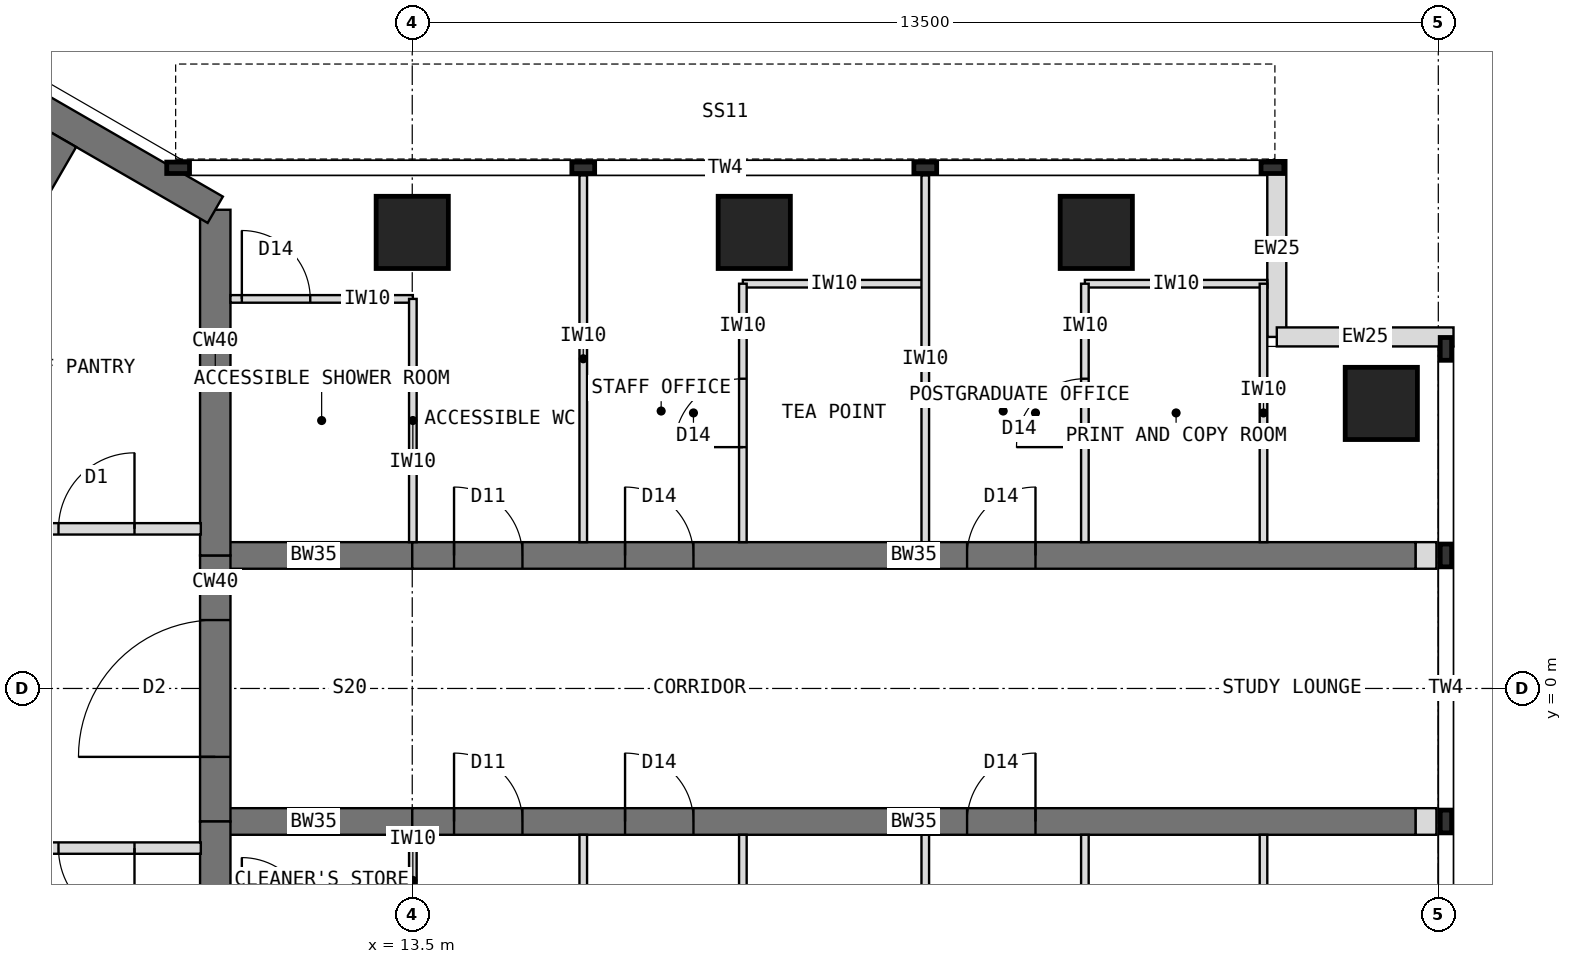
"""IFC4 building model, lengths in metres.
Left out: names, types, materials, properties, quantities, classifications, styles, units other than length and angle.
Written with IfcOpenShell. Run it as: python <this file> out.ifc"""

import sys

from ifc_helpers import new_model, si_unit, direction, frame, frame_2d, origin, origin_2d, place, context, subcontext, project, spatial, rectangle, extrude, element, fill, save


model = new_model("IFC4")
c1 = context("Model", 3, precision=1e-05, world=origin(), true_north=direction((0.0, 1.0)))
c2 = subcontext(c1, "Body", "Model", "MODEL_VIEW")
j1 = project(units=[si_unit("LENGTHUNIT", "METRE"), si_unit("PLANEANGLEUNIT", "RADIAN")], contexts=[c1])
p1 = place(None, origin())
s1 = spatial("IfcSite", under=j1, at=p1, CompositionType="ELEMENT")
p2 = place(p1, origin())
s2 = spatial("IfcBuilding", under=s1, at=p2, CompositionType="ELEMENT")
p3 = place(p2, frame((0.0, 0.0, 279.5)))
s3 = spatial("IfcBuildingStorey", under=s2, at=p3, CompositionType="ELEMENT", Elevation=279.5)
p4 = place(p3, frame((10.908, -6.298, 0.0), z_axis=(0.0, 0.0, 1.0), x_axis=(0.0, 1.0, 0.0)))
e1 = element("IfcWall", 1, at=p4, inside=s3, PredefinedType="SHEAR", context=c2, shape_type="SweptSolid", body=[
    extrude(rectangle(XDim=4.548, YDim=0.4, at=frame_2d((2.274, 0.0))), origin(), (0.0, 0.0, 1.0), 4.0),
])
p5 = place(p3, frame((10.908, -1.75, 0.0), z_axis=(0.0, 0.0, 1.0), x_axis=(0.0, 1.0, 0.0)))
e2 = element("IfcWall", 2, at=p5, inside=s3, PredefinedType="SHEAR", context=c2, shape_type="SweptSolid", body=[
    extrude(rectangle(XDim=3.5, YDim=0.4, at=frame_2d((1.75, 0.0))), origin(), (0.0, 0.0, 1.0), 4.0),
])
p6 = place(p5, frame((0.85, 0.0, 0.0)))
e3 = element("IfcOpeningElement", 3, at=p6, cuts=e2, PredefinedType="OPENING", context=c2, shape_type="SweptSolid", body=[
    extrude(rectangle(XDim=1.8, YDim=2.1, at=frame_2d((0.9, 1.05))), frame((0.0, 0.21, 0.0), z_axis=(0.0, -1.0, 0.0), x_axis=(1.0, 0.0, 0.0)), (0.0, 0.0, 1.0), 0.42),
])
p7 = place(p3, frame((10.908, 1.75, 0.0), z_axis=(0.0, 0.0, 1.0), x_axis=(0.0, 1.0, 0.0)))
e4 = element("IfcWall", 4, at=p7, inside=s3, PredefinedType="SHEAR", context=c2, shape_type="SweptSolid", body=[
    extrude(rectangle(XDim=4.548, YDim=0.4, at=frame_2d((2.274, 0.0))), origin(), (0.0, 0.0, 1.0), 4.0),
])
p8 = place(p3, frame((10.908, 6.298, 0.0), z_axis=(0.0, 0.0, 1.0), x_axis=(-0.866021940709, 0.500005998175, 0.0)))
e5 = element("IfcWall", 5, at=p8, inside=s3, PredefinedType="SHEAR", context=c2, shape_type="SweptSolid", body=[
    extrude(rectangle(XDim=12.596, YDim=0.4, at=frame_2d((6.298, 0.0))), origin(), (0.0, 0.0, 1.0), 4.0),
])
p9 = place(p3, frame((10.908, 1.75, 0.0), z_axis=(0.0, 0.0, 1.0), x_axis=(1.0, 0.0, 0.0)))
e6 = element("IfcWall", 6, at=p9, inside=s3, PredefinedType="SHEAR", context=c2, shape_type="SweptSolid", body=[
    extrude(rectangle(XDim=2.592, YDim=0.35, at=frame_2d((1.296, 0.0))), origin(), (0.0, 0.0, 1.0), 4.0),
])
p10 = place(p3, frame((13.5, 1.75, 0.0), z_axis=(0.0, 0.0, 1.0), x_axis=(1.0, 0.0, 0.0)))
e7 = element("IfcWall", 7, at=p10, inside=s3, PredefinedType="SHEAR", context=c2, shape_type="SweptSolid", body=[
    extrude(rectangle(XDim=13.2, YDim=0.35, at=frame_2d((6.6, 0.0))), origin(), (0.0, 0.0, 1.0), 4.0),
])
p11 = place(p10, frame((0.55, 0.0, 0.0)))
e8 = element("IfcOpeningElement", 8, at=p11, cuts=e7, PredefinedType="OPENING", context=c2, shape_type="SweptSolid", body=[
    extrude(rectangle(XDim=0.9, YDim=2.1, at=frame_2d((0.45, 1.05))), frame((0.0, 0.185, 0.0), z_axis=(0.0, -1.0, 0.0), x_axis=(1.0, 0.0, 0.0)), (0.0, 0.0, 1.0), 0.37),
])
p12 = place(p10, frame((2.8, 0.0, 0.0)))
e9 = element("IfcOpeningElement", 9, at=p12, cuts=e7, PredefinedType="OPENING", context=c2, shape_type="SweptSolid", body=[
    extrude(rectangle(XDim=0.9, YDim=2.1, at=frame_2d((0.45, 1.05))), frame((0.0, 0.185, 0.0), z_axis=(0.0, -1.0, 0.0), x_axis=(1.0, 0.0, 0.0)), (0.0, 0.0, 1.0), 0.37),
])
p13 = place(p10, frame((7.3, 0.0, 0.0)))
e10 = element("IfcOpeningElement", 10, at=p13, cuts=e7, PredefinedType="OPENING", context=c2, shape_type="SweptSolid", body=[
    extrude(rectangle(XDim=0.9, YDim=2.1, at=frame_2d((0.45, 1.05))), frame((0.0, 0.185, 0.0), z_axis=(0.0, -1.0, 0.0), x_axis=(1.0, 0.0, 0.0)), (0.0, 0.0, 1.0), 0.37),
])
p14 = place(p3, frame((10.908, -1.75, 0.0), z_axis=(0.0, 0.0, 1.0), x_axis=(1.0, 0.0, 0.0)))
e11 = element("IfcWall", 11, at=p14, inside=s3, PredefinedType="SHEAR", context=c2, shape_type="SweptSolid", body=[
    extrude(rectangle(XDim=2.592, YDim=0.35, at=frame_2d((1.296, 0.0))), origin(), (0.0, 0.0, 1.0), 4.0),
])
p15 = place(p3, frame((13.5, -1.75, 0.0), z_axis=(0.0, 0.0, 1.0), x_axis=(1.0, 0.0, 0.0)))
e12 = element("IfcWall", 12, at=p15, inside=s3, PredefinedType="SHEAR", context=c2, shape_type="SweptSolid", body=[
    extrude(rectangle(XDim=13.2, YDim=0.35, at=frame_2d((6.6, 0.0))), origin(), (0.0, 0.0, 1.0), 4.0),
])
p16 = place(p15, frame((0.55, 0.0, 0.0)))
e13 = element("IfcOpeningElement", 13, at=p16, cuts=e12, PredefinedType="OPENING", context=c2, shape_type="SweptSolid", body=[
    extrude(rectangle(XDim=0.9, YDim=2.1, at=frame_2d((0.45, 1.05))), frame((0.0, 0.185, 0.0), z_axis=(0.0, -1.0, 0.0), x_axis=(1.0, 0.0, 0.0)), (0.0, 0.0, 1.0), 0.37),
])
p17 = place(p15, frame((2.8, 0.0, 0.0)))
e14 = element("IfcOpeningElement", 14, at=p17, cuts=e12, PredefinedType="OPENING", context=c2, shape_type="SweptSolid", body=[
    extrude(rectangle(XDim=0.9, YDim=2.1, at=frame_2d((0.45, 1.05))), frame((0.0, 0.185, 0.0), z_axis=(0.0, -1.0, 0.0), x_axis=(1.0, 0.0, 0.0)), (0.0, 0.0, 1.0), 0.37),
])
p18 = place(p15, frame((7.3, 0.0, 0.0)))
e15 = element("IfcOpeningElement", 15, at=p18, cuts=e12, PredefinedType="OPENING", context=c2, shape_type="SweptSolid", body=[
    extrude(rectangle(XDim=0.9, YDim=2.1, at=frame_2d((0.45, 1.05))), frame((0.0, 0.185, 0.0), z_axis=(0.0, -1.0, 0.0), x_axis=(1.0, 0.0, 0.0)), (0.0, 0.0, 1.0), 0.37),
])
for number, where, z_axis, x_axis in (
    (16, (13.5, 6.0, 0.0), (0.0, 0.0, 1.0), (1.0, 0.0, 0.0)),
    (17, (18.0, 6.0, 0.0), (0.0, 0.0, 1.0), (1.0, 0.0, 0.0)),
    (18, (22.5, 6.0, 0.0), (0.0, 0.0, 1.0), (1.0, 0.0, 0.0)),
    (19, (26.25, 3.75, 0.0), (0.0, 0.0, 1.0), (1.0, 0.0, 0.0)),
):
    element("IfcColumn", number, at=place(p3, frame(where, z_axis=z_axis, x_axis=x_axis)), inside=s3, PredefinedType="COLUMN", context=c2, shape_type="SweptSolid", body=[
        extrude(rectangle(XDim=0.95, YDim=0.95, at=origin_2d()), origin(), (0.0, 0.0, 1.0), 4.0),
    ])
for number, where, z_axis, x_axis in (
    (20, (24.875, 6.95, 0.0), (0.0, 0.0, 1.0), (0.0, -1.0, 0.0)),
    (21, (24.875, 4.625, 0.0), (0.0, 0.0, 1.0), (1.0, 0.0, 0.0)),
):
    element("IfcWall", number, at=place(p3, frame(where, z_axis=z_axis, x_axis=x_axis)), inside=s3, PredefinedType="STANDARD", context=c2, shape_type="SweptSolid", body=[
        extrude(rectangle(XDim=2.325, YDim=0.25, at=frame_2d((1.163, 0.0))), origin(), (0.0, 0.0, 1.0), 3.8),
    ])
for number, where, z_axis, x_axis in (
    (22, (26.7, 1.75, 0.0), (0.0, 0.0, 1.0), (1.0, 0.0, 0.0)),
    (23, (26.7, -1.75, 0.0), (0.0, 0.0, 1.0), (1.0, 0.0, 0.0)),
):
    element("IfcWall", number, at=place(p3, frame(where, z_axis=z_axis, x_axis=x_axis)), inside=s3, PredefinedType="PARTITIONING", context=c2, shape_type="SweptSolid", body=[
        extrude(rectangle(XDim=0.275, YDim=0.35, at=frame_2d((0.138, 0.0))), origin(), (0.0, 0.0, 1.0), 3.8),
    ])
for number, where, z_axis, x_axis in (
    (24, (5.901, 2.02, 0.0), (0.0, 0.0, 1.0), (0.5, 0.866, 0.0)),
    (25, (5.901, -2.02, 0.0), (0.0, 0.0, 1.0), (0.5, -0.866, 0.0)),
):
    element("IfcWall", number, at=place(p3, frame(where, z_axis=z_axis, x_axis=x_axis)), inside=s3, PredefinedType="SHEAR", context=c2, shape_type="SweptSolid", body=[
        extrude(rectangle(XDim=6.008, YDim=0.4, at=frame_2d((3.004, 0.0))), origin(), (0.0, 0.0, 1.0), 4.0),
    ])
for number, where, z_axis, x_axis in (
    (26, (15.75, 1.925, 0.0), (0.0, 0.0, 1.0), (0.0, 1.0, 0.0)),
    (27, (20.25, 1.925, 0.0), (0.0, 0.0, 1.0), (0.0, 1.0, 0.0)),
):
    element("IfcWall", number, at=place(p3, frame(where, z_axis=z_axis, x_axis=x_axis)), inside=s3, PredefinedType="PARTITIONING", context=c2, shape_type="SweptSolid", body=[
        extrude(rectangle(XDim=4.825, YDim=0.1, at=frame_2d((2.413, 0.0))), origin(), (0.0, 0.0, 1.0), 3.8),
    ])
p19 = place(p3, frame((17.85, 5.325, 0.0), z_axis=(0.0, 0.0, 1.0), x_axis=(1.0, 0.0, 0.0)))
e28 = element("IfcWall", 28, at=p19, inside=s3, PredefinedType="PARTITIONING", context=c2, shape_type="SweptSolid", body=[
    extrude(rectangle(XDim=2.4, YDim=0.1, at=frame_2d((1.2, 0.0))), origin(), (0.0, 0.0, 1.0), 3.8),
])
p20 = place(p3, frame((17.85, 1.925, 0.0), z_axis=(0.0, 0.0, 1.0), x_axis=(0.0, 1.0, 0.0)))
e29 = element("IfcWall", 29, at=p20, inside=s3, PredefinedType="PARTITIONING", context=c2, shape_type="SweptSolid", body=[
    extrude(rectangle(XDim=3.4, YDim=0.1, at=frame_2d((1.7, 0.0))), origin(), (0.0, 0.0, 1.0), 3.8),
])
p21 = place(p20, frame((1.25, 0.0, 0.0)))
e30 = element("IfcOpeningElement", 30, at=p21, cuts=e29, PredefinedType="OPENING", context=c2, shape_type="SweptSolid", body=[
    extrude(rectangle(XDim=0.9, YDim=2.1, at=frame_2d((0.45, 1.05))), frame((0.0, 0.06, 0.0), z_axis=(0.0, -1.0, 0.0), x_axis=(1.0, 0.0, 0.0)), (0.0, 0.0, 1.0), 0.12),
])
p22 = place(p3, frame((22.35, 5.325, 0.0), z_axis=(0.0, 0.0, 1.0), x_axis=(1.0, 0.0, 0.0)))
e31 = element("IfcWall", 31, at=p22, inside=s3, PredefinedType="PARTITIONING", context=c2, shape_type="SweptSolid", body=[
    extrude(rectangle(XDim=2.4, YDim=0.1, at=frame_2d((1.2, 0.0))), origin(), (0.0, 0.0, 1.0), 3.8),
])
p23 = place(p3, frame((22.35, 1.925, 0.0), z_axis=(0.0, 0.0, 1.0), x_axis=(0.0, 1.0, 0.0)))
e32 = element("IfcWall", 32, at=p23, inside=s3, PredefinedType="PARTITIONING", context=c2, shape_type="SweptSolid", body=[
    extrude(rectangle(XDim=3.4, YDim=0.1, at=frame_2d((1.7, 0.0))), origin(), (0.0, 0.0, 1.0), 3.8),
])
p24 = place(p23, frame((1.25, 0.0, 0.0)))
e33 = element("IfcOpeningElement", 33, at=p24, cuts=e32, PredefinedType="OPENING", context=c2, shape_type="SweptSolid", body=[
    extrude(rectangle(XDim=0.9, YDim=2.1, at=frame_2d((0.45, 1.05))), frame((0.0, 0.06, 0.0), z_axis=(0.0, -1.0, 0.0), x_axis=(1.0, 0.0, 0.0)), (0.0, 0.0, 1.0), 0.12),
])
p25 = place(p3, frame((24.7, 1.925, 0.0), z_axis=(0.0, 0.0, 1.0), x_axis=(0.0, 1.0, 0.0)))
e34 = element("IfcWall", 34, at=p25, inside=s3, PredefinedType="PARTITIONING", context=c2, shape_type="SweptSolid", body=[
    extrude(rectangle(XDim=3.4, YDim=0.1, at=frame_2d((1.7, 0.0))), origin(), (0.0, 0.0, 1.0), 3.8),
])
p26 = place(p3, frame((11.108, 5.125, 0.0), z_axis=(0.0, 0.0, 1.0), x_axis=(1.0, 0.0, 0.0)))
e35 = element("IfcWall", 35, at=p26, inside=s3, PredefinedType="PARTITIONING", context=c2, shape_type="SweptSolid", body=[
    extrude(rectangle(XDim=2.4, YDim=0.1, at=frame_2d((1.2, 0.0))), origin(), (0.0, 0.0, 1.0), 3.8),
])
p27 = place(p26, frame((0.15, 0.0, 0.0)))
e36 = element("IfcOpeningElement", 36, at=p27, cuts=e35, PredefinedType="OPENING", context=c2, shape_type="SweptSolid", body=[
    extrude(rectangle(XDim=0.9, YDim=2.1, at=frame_2d((0.45, 1.05))), frame((0.0, 0.06, 0.0), z_axis=(0.0, -1.0, 0.0), x_axis=(1.0, 0.0, 0.0)), (0.0, 0.0, 1.0), 0.12),
])
p28 = place(p3, frame((13.508, 1.925, 0.0), z_axis=(0.0, 0.0, 1.0), x_axis=(0.0, 1.0, 0.0)))
e37 = element("IfcWall", 37, at=p28, inside=s3, PredefinedType="PARTITIONING", context=c2, shape_type="SweptSolid", body=[
    extrude(rectangle(XDim=3.2, YDim=0.1, at=frame_2d((1.6, 0.0))), origin(), (0.0, 0.0, 1.0), 3.267),
])
for number, where, z_axis, x_axis in (
    (38, (15.75, -1.925, 0.0), (0.0, 0.0, 1.0), (0.0, -1.0, 0.0)),
    (39, (20.25, -1.925, 0.0), (0.0, 0.0, 1.0), (0.0, -1.0, 0.0)),
):
    element("IfcWall", number, at=place(p3, frame(where, z_axis=z_axis, x_axis=x_axis)), inside=s3, PredefinedType="PARTITIONING", context=c2, shape_type="SweptSolid", body=[
        extrude(rectangle(XDim=4.825, YDim=0.1, at=frame_2d((2.413, 0.0))), origin(), (0.0, 0.0, 1.0), 3.8),
    ])
p29 = place(p3, frame((17.85, -1.925, 0.0), z_axis=(0.0, 0.0, 1.0), x_axis=(0.0, -1.0, 0.0)))
e40 = element("IfcWall", 40, at=p29, inside=s3, PredefinedType="PARTITIONING", context=c2, shape_type="SweptSolid", body=[
    extrude(rectangle(XDim=3.4, YDim=0.1, at=frame_2d((1.7, 0.0))), origin(), (0.0, 0.0, 1.0), 3.8),
])
p30 = place(p29, frame((1.25, 0.0, 0.0)))
e41 = element("IfcOpeningElement", 41, at=p30, cuts=e40, PredefinedType="OPENING", context=c2, shape_type="SweptSolid", body=[
    extrude(rectangle(XDim=0.9, YDim=2.1, at=frame_2d((0.45, 1.05))), frame((0.0, 0.06, 0.0), z_axis=(0.0, -1.0, 0.0), x_axis=(1.0, 0.0, 0.0)), (0.0, 0.0, 1.0), 0.12),
])
p31 = place(p3, frame((22.35, -1.925, 0.0), z_axis=(0.0, 0.0, 1.0), x_axis=(0.0, -1.0, 0.0)))
e42 = element("IfcWall", 42, at=p31, inside=s3, PredefinedType="PARTITIONING", context=c2, shape_type="SweptSolid", body=[
    extrude(rectangle(XDim=3.4, YDim=0.1, at=frame_2d((1.7, 0.0))), origin(), (0.0, 0.0, 1.0), 3.8),
])
p32 = place(p31, frame((1.25, 0.0, 0.0)))
e43 = element("IfcOpeningElement", 43, at=p32, cuts=e42, PredefinedType="OPENING", context=c2, shape_type="SweptSolid", body=[
    extrude(rectangle(XDim=0.9, YDim=2.1, at=frame_2d((0.45, 1.05))), frame((0.0, 0.06, 0.0), z_axis=(0.0, -1.0, 0.0), x_axis=(1.0, 0.0, 0.0)), (0.0, 0.0, 1.0), 0.12),
])
p33 = place(p3, frame((24.7, -1.925, 0.0), z_axis=(0.0, 0.0, 1.0), x_axis=(0.0, -1.0, 0.0)))
e44 = element("IfcWall", 44, at=p33, inside=s3, PredefinedType="PARTITIONING", context=c2, shape_type="SweptSolid", body=[
    extrude(rectangle(XDim=3.4, YDim=0.1, at=frame_2d((1.7, 0.0))), origin(), (0.0, 0.0, 1.0), 3.8),
])
p34 = place(p3, frame((13.508, -1.925, 0.0), z_axis=(0.0, 0.0, 1.0), x_axis=(0.0, -1.0, 0.0)))
e45 = element("IfcWall", 45, at=p34, inside=s3, PredefinedType="PARTITIONING", context=c2, shape_type="SweptSolid", body=[
    extrude(rectangle(XDim=1.2, YDim=0.1, at=frame_2d((0.6, 0.0))), origin(), (0.0, 0.0, 1.0), 3.267),
])
p35 = place(p3, frame((6.143, 2.1, 0.0), z_axis=(0.0, 0.0, 1.0), x_axis=(1.0, 0.0, 0.0)))
e46 = element("IfcWall", 46, at=p35, inside=s3, PredefinedType="PARTITIONING", context=c2, shape_type="SweptSolid", body=[
    extrude(rectangle(XDim=4.576, YDim=0.15, at=frame_2d((2.288, 0.0))), origin(), (0.0, 0.0, 1.0), 3.8),
])
p36 = place(p35, frame((2.703, 0.0, 0.0)))
e47 = element("IfcOpeningElement", 47, at=p36, cuts=e46, PredefinedType="OPENING", context=c2, shape_type="SweptSolid", body=[
    extrude(rectangle(XDim=1.0, YDim=2.1, at=frame_2d((0.5, 1.05))), frame((0.0, 0.085, 0.0), z_axis=(0.0, -1.0, 0.0), x_axis=(1.0, 0.0, 0.0)), (0.0, 0.0, 1.0), 0.17),
])
p37 = place(p3, frame((10.718, -2.1, 0.0), z_axis=(0.0, 0.0, 1.0), x_axis=(-1.0, 0.0, 0.0)))
e48 = element("IfcWall", 48, at=p37, inside=s3, PredefinedType="PARTITIONING", context=c2, shape_type="SweptSolid", body=[
    extrude(rectangle(XDim=4.576, YDim=0.15, at=frame_2d((2.288, 0.0))), origin(), (0.0, 0.0, 1.0), 3.8),
])
p38 = place(p37, frame((0.873, 0.0, 0.0)))
e49 = element("IfcOpeningElement", 49, at=p38, cuts=e48, PredefinedType="OPENING", context=c2, shape_type="SweptSolid", body=[
    extrude(rectangle(XDim=1.0, YDim=2.1, at=frame_2d((0.5, 1.05))), frame((0.0, 0.085, 0.0), z_axis=(0.0, -1.0, 0.0), x_axis=(1.0, 0.0, 0.0)), (0.0, 0.0, 1.0), 0.17),
])
p39 = place(p6, origin())
e50 = element("IfcDoor", 50, at=p39, inside=s3, OperationType="DOUBLE_DOOR_DOUBLE_SWING", PredefinedType="DOOR", context=c2, shape_type="SweptSolid", body=[
    extrude(rectangle(XDim=1.8, YDim=2.1, at=frame_2d((0.9, 1.05))), frame((0.0, 0.025, 0.0), z_axis=(0.0, -1.0, 0.0), x_axis=(1.0, 0.0, 0.0)), (0.0, 0.0, 1.0), 0.05),
])
fill(e3, e50)
p40 = place(p21, origin())
e51 = element("IfcDoor", 51, at=p40, inside=s3, OperationType="SINGLE_SWING_LEFT", PredefinedType="DOOR", context=c2, shape_type="SweptSolid", body=[
    extrude(rectangle(XDim=0.9, YDim=2.1, at=frame_2d((0.45, 1.05))), frame((0.0, 0.025, 0.0), z_axis=(0.0, -1.0, 0.0), x_axis=(1.0, 0.0, 0.0)), (0.0, 0.0, 1.0), 0.05),
])
fill(e30, e51)
p41 = place(p24, origin())
e52 = element("IfcDoor", 52, at=p41, inside=s3, OperationType="SINGLE_SWING_LEFT", PredefinedType="DOOR", context=c2, shape_type="SweptSolid", body=[
    extrude(rectangle(XDim=0.9, YDim=2.1, at=frame_2d((0.45, 1.05))), frame((0.0, 0.025, 0.0), z_axis=(0.0, -1.0, 0.0), x_axis=(1.0, 0.0, 0.0)), (0.0, 0.0, 1.0), 0.05),
])
fill(e33, e52)
p42 = place(p27, origin())
e53 = element("IfcDoor", 53, at=p42, inside=s3, OperationType="SINGLE_SWING_LEFT", PredefinedType="DOOR", context=c2, shape_type="SweptSolid", body=[
    extrude(rectangle(XDim=0.9, YDim=2.1, at=frame_2d((0.45, 1.05))), frame((0.0, 0.025, 0.0), z_axis=(0.0, -1.0, 0.0), x_axis=(1.0, 0.0, 0.0)), (0.0, 0.0, 1.0), 0.05),
])
fill(e36, e53)
p43 = place(p38, origin())
e54 = element("IfcDoor", 54, at=p43, inside=s3, OperationType="SINGLE_SWING_LEFT", PredefinedType="DOOR", context=c2, shape_type="SweptSolid", body=[
    extrude(rectangle(XDim=1.0, YDim=2.1, at=frame_2d((0.5, 1.05))), frame((0.0, 0.025, 0.0), z_axis=(0.0, -1.0, 0.0), x_axis=(1.0, 0.0, 0.0)), (0.0, 0.0, 1.0), 0.05),
])
fill(e49, e54)
p44 = place(p36, origin())
e55 = element("IfcDoor", 55, at=p44, inside=s3, OperationType="SINGLE_SWING_RIGHT", PredefinedType="DOOR", context=c2, shape_type="SweptSolid", body=[
    extrude(rectangle(XDim=1.0, YDim=2.1, at=frame_2d((0.5, 1.05))), frame((0.0, 0.025, 0.0), z_axis=(0.0, -1.0, 0.0), x_axis=(1.0, 0.0, 0.0)), (0.0, 0.0, 1.0), 0.05),
])
fill(e47, e55)
p45 = place(p11, origin())
e56 = element("IfcDoor", 56, at=p45, inside=s3, OperationType="SINGLE_SWING_LEFT", PredefinedType="DOOR", context=c2, shape_type="SweptSolid", body=[
    extrude(rectangle(XDim=0.9, YDim=2.1, at=frame_2d((0.45, 1.05))), frame((0.0, 0.025, 0.0), z_axis=(0.0, -1.0, 0.0), x_axis=(1.0, 0.0, 0.0)), (0.0, 0.0, 1.0), 0.05),
])
fill(e8, e56)
p46 = place(p12, origin())
e57 = element("IfcDoor", 57, at=p46, inside=s3, OperationType="SINGLE_SWING_LEFT", PredefinedType="DOOR", context=c2, shape_type="SweptSolid", body=[
    extrude(rectangle(XDim=0.9, YDim=2.1, at=frame_2d((0.45, 1.05))), frame((0.0, 0.025, 0.0), z_axis=(0.0, -1.0, 0.0), x_axis=(1.0, 0.0, 0.0)), (0.0, 0.0, 1.0), 0.05),
])
fill(e9, e57)
p47 = place(p13, origin())
e58 = element("IfcDoor", 58, at=p47, inside=s3, OperationType="SINGLE_SWING_RIGHT", PredefinedType="DOOR", context=c2, shape_type="SweptSolid", body=[
    extrude(rectangle(XDim=0.9, YDim=2.1, at=frame_2d((0.45, 1.05))), frame((0.0, 0.025, 0.0), z_axis=(0.0, -1.0, 0.0), x_axis=(1.0, 0.0, 0.0)), (0.0, 0.0, 1.0), 0.05),
])
fill(e10, e58)
p48 = place(p16, origin())
e59 = element("IfcDoor", 59, at=p48, inside=s3, OperationType="SINGLE_SWING_LEFT", PredefinedType="DOOR", context=c2, shape_type="SweptSolid", body=[
    extrude(rectangle(XDim=0.9, YDim=2.1, at=frame_2d((0.45, 1.05))), frame((0.0, 0.025, 0.0), z_axis=(0.0, -1.0, 0.0), x_axis=(1.0, 0.0, 0.0)), (0.0, 0.0, 1.0), 0.05),
])
fill(e13, e59)
p49 = place(p17, origin())
e60 = element("IfcDoor", 60, at=p49, inside=s3, OperationType="SINGLE_SWING_LEFT", PredefinedType="DOOR", context=c2, shape_type="SweptSolid", body=[
    extrude(rectangle(XDim=0.9, YDim=2.1, at=frame_2d((0.45, 1.05))), frame((0.0, 0.025, 0.0), z_axis=(0.0, -1.0, 0.0), x_axis=(1.0, 0.0, 0.0)), (0.0, 0.0, 1.0), 0.05),
])
fill(e14, e60)
p50 = place(p18, origin())
e61 = element("IfcDoor", 61, at=p50, inside=s3, OperationType="SINGLE_SWING_RIGHT", PredefinedType="DOOR", context=c2, shape_type="SweptSolid", body=[
    extrude(rectangle(XDim=0.9, YDim=2.1, at=frame_2d((0.45, 1.05))), frame((0.0, 0.025, 0.0), z_axis=(0.0, -1.0, 0.0), x_axis=(1.0, 0.0, 0.0)), (0.0, 0.0, 1.0), 0.05),
])
fill(e15, e61)
save(model, sys.argv[1])
